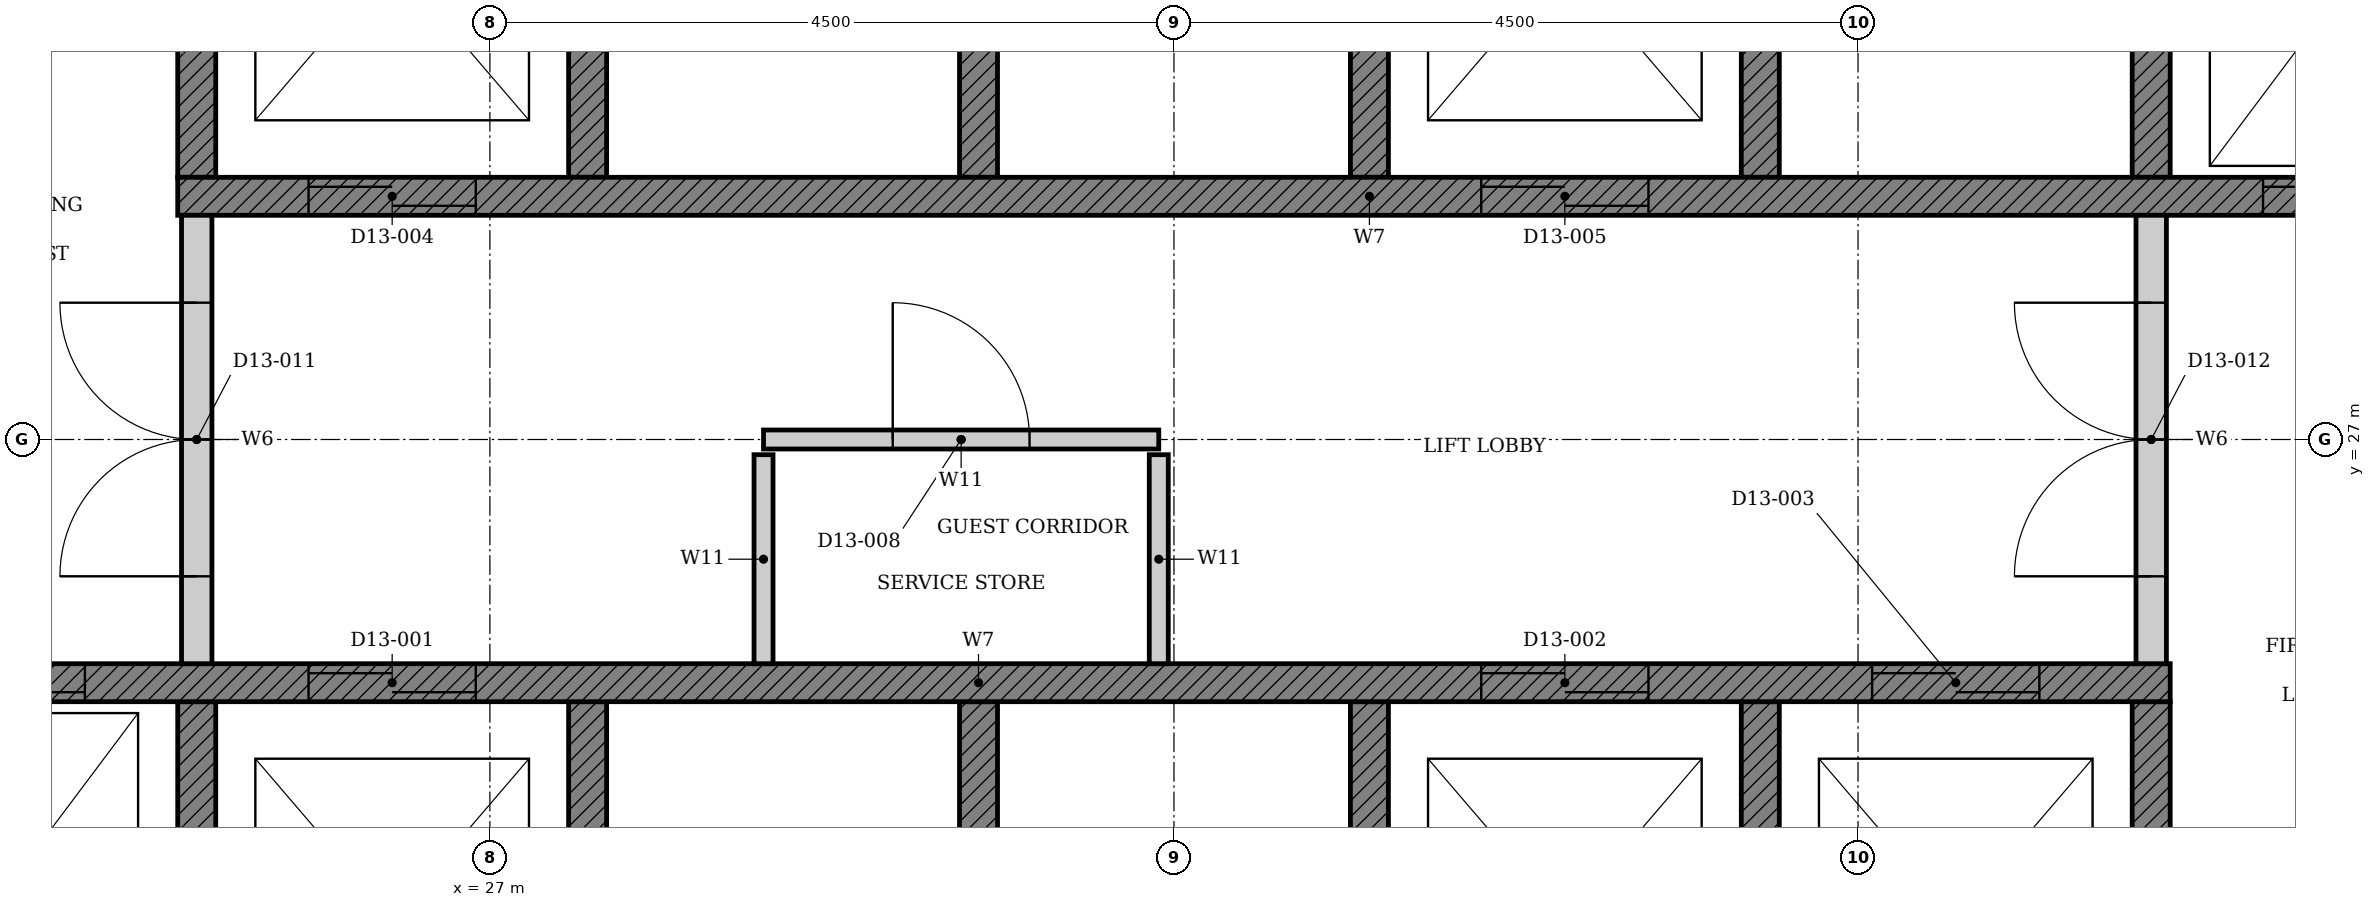
"""IFC4 building model, lengths in metres.
Left out: names, types, materials, properties, quantities, classifications, styles, units other than length and angle.
Written with IfcOpenShell. Run it as: python <this file> out.ifc"""

import sys

from ifc_helpers import new_model, si_unit, direction, frame, frame_2d, origin, place, context, subcontext, project, spatial, polyline, rectangle, outline, extrude, element, fill, save


model = new_model("IFC4")
c1 = context("Model", 3, precision=1e-05, world=origin(), true_north=direction((0.0, 1.0)))
c2 = subcontext(c1, "Body", "Model", "MODEL_VIEW")
j1 = project(units=[si_unit("LENGTHUNIT", "METRE"), si_unit("PLANEANGLEUNIT", "RADIAN")], contexts=[c1])
p1 = place(None, origin())
s1 = spatial("IfcSite", under=j1, at=p1, CompositionType="ELEMENT")
p2 = place(p1, origin())
s2 = spatial("IfcBuilding", under=s1, at=p2, CompositionType="ELEMENT")
p3 = place(p2, frame((0.0, 0.0, 60.0)))
s3 = spatial("IfcBuildingStorey", under=s2, at=p3, CompositionType="ELEMENT", Elevation=60.0)
p4 = place(p3, origin())
e1 = element("IfcWall", 1, at=p4, inside=s3, PredefinedType="SHEAR", context=c2, shape_type="SweptSolid", body=[
    extrude(outline(polyline([(22.375, 22.35), (38.053, 22.35), (38.053, 25.275), (37.803, 25.275), (37.803, 22.65), (35.482, 22.65), (35.482, 25.275), (35.232, 25.275), (35.232, 22.65), (32.911, 22.65), (32.911, 25.275), (32.661, 25.275), (32.661, 22.65), (30.339, 22.65), (30.339, 25.275), (30.089, 25.275), (30.089, 22.65), (27.768, 22.65), (27.768, 25.275), (27.518, 25.275), (27.518, 22.65), (25.197, 22.65), (25.197, 25.275), (24.947, 25.275), (24.947, 22.65), (22.625, 22.65), (22.625, 25.275), (22.375, 25.275), (22.375, 22.35)])), origin(), (0.0, 0.0, 1.0), 3.3),
])
p5 = place(p3, origin())
e2 = element("IfcWall", 2, at=p5, inside=s3, PredefinedType="SHEAR", context=c2, shape_type="SweptSolid", body=[
    extrude(outline(polyline([(24.947, 28.725), (25.197, 28.725), (25.197, 31.35), (27.518, 31.35), (27.518, 28.725), (27.768, 28.725), (27.768, 31.35), (30.089, 31.35), (30.089, 28.725), (30.339, 28.725), (30.339, 31.35), (32.661, 31.35), (32.661, 28.725), (32.911, 28.725), (32.911, 31.35), (35.232, 31.35), (35.232, 28.725), (35.482, 28.725), (35.482, 31.35), (37.803, 31.35), (37.803, 28.725), (38.053, 28.725), (38.053, 31.35), (40.375, 31.35), (40.375, 28.725), (40.625, 28.725), (40.625, 31.65), (24.947, 31.65), (24.947, 28.725)])), origin(), (0.0, 0.0, 1.0), 3.3),
])
p6 = place(p3, frame((22.375, 25.4, 0.0), z_axis=(0.0, 0.0, 1.0), x_axis=(1.0, 0.0, 0.0)))
e3 = element("IfcWall", 3, at=p6, inside=s3, PredefinedType="SHEAR", context=c2, shape_type="SweptSolid", body=[
    extrude(rectangle(XDim=15.678, YDim=0.25, at=frame_2d((7.839, 0.0))), origin(), (0.0, 0.0, 1.0), 3.3),
])
p7 = place(p6, frame((3.432, 0.0, 0.0)))
e4 = element("IfcOpeningElement", 4, at=p7, cuts=e3, PredefinedType="OPENING", context=c2, shape_type="SweptSolid", body=[
    extrude(rectangle(XDim=1.1, YDim=2.1, at=frame_2d((0.55, 1.05))), frame((0.0, 0.135, 0.0), z_axis=(0.0, -1.0, 0.0), x_axis=(1.0, 0.0, 0.0)), (0.0, 0.0, 1.0), 0.27),
])
p8 = place(p6, frame((11.146, 0.0, 0.0)))
e5 = element("IfcOpeningElement", 5, at=p8, cuts=e3, PredefinedType="OPENING", context=c2, shape_type="SweptSolid", body=[
    extrude(rectangle(XDim=1.1, YDim=2.1, at=frame_2d((0.55, 1.05))), frame((0.0, 0.135, 0.0), z_axis=(0.0, -1.0, 0.0), x_axis=(1.0, 0.0, 0.0)), (0.0, 0.0, 1.0), 0.27),
])
p9 = place(p6, frame((13.718, 0.0, 0.0)))
e6 = element("IfcOpeningElement", 6, at=p9, cuts=e3, PredefinedType="OPENING", context=c2, shape_type="SweptSolid", body=[
    extrude(rectangle(XDim=1.1, YDim=2.1, at=frame_2d((0.55, 1.05))), frame((0.0, 0.135, 0.0), z_axis=(0.0, -1.0, 0.0), x_axis=(1.0, 0.0, 0.0)), (0.0, 0.0, 1.0), 0.27),
])
p10 = place(p6, frame((0.861, 0.0, 0.0)))
e7 = element("IfcOpeningElement", 7, at=p10, cuts=e3, PredefinedType="OPENING", context=c2, shape_type="SweptSolid", body=[
    extrude(rectangle(XDim=1.1, YDim=2.1, at=frame_2d((0.55, 1.05))), frame((0.0, 0.135, 0.0), z_axis=(0.0, -1.0, 0.0), x_axis=(1.0, 0.0, 0.0)), (0.0, 0.0, 1.0), 0.27),
])
p11 = place(p3, frame((24.947, 28.6, 0.0), z_axis=(0.0, 0.0, 1.0), x_axis=(1.0, 0.0, 0.0)))
e8 = element("IfcWall", 8, at=p11, inside=s3, PredefinedType="SHEAR", context=c2, shape_type="SweptSolid", body=[
    extrude(rectangle(XDim=15.678, YDim=0.25, at=frame_2d((7.839, 0.0))), origin(), (0.0, 0.0, 1.0), 3.3),
])
p12 = place(p11, frame((0.861, 0.0, 0.0)))
e9 = element("IfcOpeningElement", 9, at=p12, cuts=e8, PredefinedType="OPENING", context=c2, shape_type="SweptSolid", body=[
    extrude(rectangle(XDim=1.1, YDim=2.1, at=frame_2d((0.55, 1.05))), frame((0.0, 0.135, 0.0), z_axis=(0.0, -1.0, 0.0), x_axis=(1.0, 0.0, 0.0)), (0.0, 0.0, 1.0), 0.27),
])
p13 = place(p11, frame((8.575, 0.0, 0.0)))
e10 = element("IfcOpeningElement", 10, at=p13, cuts=e8, PredefinedType="OPENING", context=c2, shape_type="SweptSolid", body=[
    extrude(rectangle(XDim=1.1, YDim=2.1, at=frame_2d((0.55, 1.05))), frame((0.0, 0.135, 0.0), z_axis=(0.0, -1.0, 0.0), x_axis=(1.0, 0.0, 0.0)), (0.0, 0.0, 1.0), 0.27),
])
p14 = place(p11, frame((13.718, 0.0, 0.0)))
e11 = element("IfcOpeningElement", 11, at=p14, cuts=e8, PredefinedType="OPENING", context=c2, shape_type="SweptSolid", body=[
    extrude(rectangle(XDim=1.1, YDim=2.1, at=frame_2d((0.55, 1.05))), frame((0.0, 0.135, 0.0), z_axis=(0.0, -1.0, 0.0), x_axis=(1.0, 0.0, 0.0)), (0.0, 0.0, 1.0), 0.27),
])
p15 = place(p3, frame((28.8, 27.0, 0.0), z_axis=(0.0, 0.0, 1.0), x_axis=(1.0, 0.0, 0.0)))
e12 = element("IfcWall", 12, at=p15, inside=s3, PredefinedType="PARTITIONING", context=c2, shape_type="SweptSolid", body=[
    extrude(rectangle(XDim=2.6, YDim=0.125, at=frame_2d((1.3, 0.0))), origin(), (0.0, 0.0, 1.0), 3.3),
])
p16 = place(p15, frame((0.85, 0.0, 0.0)))
e13 = element("IfcOpeningElement", 13, at=p16, cuts=e12, PredefinedType="OPENING", context=c2, shape_type="SweptSolid", body=[
    extrude(rectangle(XDim=0.9, YDim=2.1, at=frame_2d((0.45, 1.05))), frame((0.0, 0.073, 0.0), z_axis=(0.0, -1.0, 0.0), x_axis=(1.0, 0.0, 0.0)), (0.0, 0.0, 1.0), 0.145),
])
for number, where, z_axis, x_axis in (
    (14, (28.8, 25.525, 0.0), (0.0, 0.0, 1.0), (0.0, 1.0, 0.0)),
    (15, (31.4, 25.525, 0.0), (0.0, 0.0, 1.0), (0.0, 1.0, 0.0)),
):
    element("IfcWall", number, at=place(p3, frame(where, z_axis=z_axis, x_axis=x_axis)), inside=s3, PredefinedType="PARTITIONING", context=c2, shape_type="SweptSolid", body=[
        extrude(rectangle(XDim=1.375, YDim=0.125, at=frame_2d((0.688, 0.0))), origin(), (0.0, 0.0, 1.0), 3.3),
    ])
p17 = place(p3, frame((25.072, 25.525, 0.0), z_axis=(0.0, 0.0, 1.0), x_axis=(0.0, 1.0, 0.0)))
e16 = element("IfcWall", 16, at=p17, inside=s3, PredefinedType="PARTITIONING", context=c2, shape_type="SweptSolid", body=[
    extrude(rectangle(XDim=2.95, YDim=0.2, at=frame_2d((1.475, 0.0))), origin(), (0.0, 0.0, 1.0), 3.3),
])
p18 = place(p17, frame((0.575, 0.0, 0.0)))
e17 = element("IfcOpeningElement", 17, at=p18, cuts=e16, PredefinedType="OPENING", context=c2, shape_type="SweptSolid", body=[
    extrude(rectangle(XDim=1.8, YDim=2.1, at=frame_2d((0.9, 1.05))), frame((0.0, 0.11, 0.0), z_axis=(0.0, -1.0, 0.0), x_axis=(1.0, 0.0, 0.0)), (0.0, 0.0, 1.0), 0.22),
])
p19 = place(p3, frame((37.928, 25.525, 0.0), z_axis=(0.0, 0.0, 1.0), x_axis=(0.0, 1.0, 0.0)))
e18 = element("IfcWall", 18, at=p19, inside=s3, PredefinedType="PARTITIONING", context=c2, shape_type="SweptSolid", body=[
    extrude(rectangle(XDim=2.95, YDim=0.2, at=frame_2d((1.475, 0.0))), origin(), (0.0, 0.0, 1.0), 3.3),
])
p20 = place(p19, frame((0.575, 0.0, 0.0)))
e19 = element("IfcOpeningElement", 19, at=p20, cuts=e18, PredefinedType="OPENING", context=c2, shape_type="SweptSolid", body=[
    extrude(rectangle(XDim=1.8, YDim=2.1, at=frame_2d((0.9, 1.05))), frame((0.0, 0.11, 0.0), z_axis=(0.0, -1.0, 0.0), x_axis=(1.0, 0.0, 0.0)), (0.0, 0.0, 1.0), 0.22),
])
p21 = place(p7, origin())
e20 = element("IfcDoor", 20, at=p21, inside=s3, OperationType="DOUBLE_DOOR_SLIDING", PredefinedType="DOOR", context=c2, shape_type="SweptSolid", body=[
    extrude(rectangle(XDim=1.1, YDim=2.1, at=frame_2d((0.55, 1.05))), frame((0.0, 0.025, 0.0), z_axis=(0.0, -1.0, 0.0), x_axis=(1.0, 0.0, 0.0)), (0.0, 0.0, 1.0), 0.05),
])
fill(e4, e20)
p22 = place(p8, origin())
e21 = element("IfcDoor", 21, at=p22, inside=s3, OperationType="DOUBLE_DOOR_SLIDING", PredefinedType="DOOR", context=c2, shape_type="SweptSolid", body=[
    extrude(rectangle(XDim=1.1, YDim=2.1, at=frame_2d((0.55, 1.05))), frame((0.0, 0.025, 0.0), z_axis=(0.0, -1.0, 0.0), x_axis=(1.0, 0.0, 0.0)), (0.0, 0.0, 1.0), 0.05),
])
fill(e5, e21)
p23 = place(p9, origin())
e22 = element("IfcDoor", 22, at=p23, inside=s3, OperationType="DOUBLE_DOOR_SLIDING", PredefinedType="DOOR", context=c2, shape_type="SweptSolid", body=[
    extrude(rectangle(XDim=1.1, YDim=2.1, at=frame_2d((0.55, 1.05))), frame((0.0, 0.025, 0.0), z_axis=(0.0, -1.0, 0.0), x_axis=(1.0, 0.0, 0.0)), (0.0, 0.0, 1.0), 0.05),
])
fill(e6, e22)
p24 = place(p12, origin())
e23 = element("IfcDoor", 23, at=p24, inside=s3, OperationType="DOUBLE_DOOR_SLIDING", PredefinedType="DOOR", context=c2, shape_type="SweptSolid", body=[
    extrude(rectangle(XDim=1.1, YDim=2.1, at=frame_2d((0.55, 1.05))), frame((0.0, 0.025, 0.0), z_axis=(0.0, -1.0, 0.0), x_axis=(1.0, 0.0, 0.0)), (0.0, 0.0, 1.0), 0.05),
])
fill(e9, e23)
p25 = place(p13, origin())
e24 = element("IfcDoor", 24, at=p25, inside=s3, OperationType="DOUBLE_DOOR_SLIDING", PredefinedType="DOOR", context=c2, shape_type="SweptSolid", body=[
    extrude(rectangle(XDim=1.1, YDim=2.1, at=frame_2d((0.55, 1.05))), frame((0.0, 0.025, 0.0), z_axis=(0.0, -1.0, 0.0), x_axis=(1.0, 0.0, 0.0)), (0.0, 0.0, 1.0), 0.05),
])
fill(e10, e24)
p26 = place(p10, origin())
e25 = element("IfcDoor", 25, at=p26, inside=s3, OperationType="DOUBLE_DOOR_SLIDING", PredefinedType="DOOR", context=c2, shape_type="SweptSolid", body=[
    extrude(rectangle(XDim=1.1, YDim=2.1, at=frame_2d((0.55, 1.05))), frame((0.0, 0.025, 0.0), z_axis=(0.0, -1.0, 0.0), x_axis=(1.0, 0.0, 0.0)), (0.0, 0.0, 1.0), 0.05),
])
fill(e7, e25)
p27 = place(p14, origin())
e26 = element("IfcDoor", 26, at=p27, inside=s3, OperationType="DOUBLE_DOOR_SLIDING", PredefinedType="DOOR", context=c2, shape_type="SweptSolid", body=[
    extrude(rectangle(XDim=1.1, YDim=2.1, at=frame_2d((0.55, 1.05))), frame((0.0, 0.025, 0.0), z_axis=(0.0, -1.0, 0.0), x_axis=(1.0, 0.0, 0.0)), (0.0, 0.0, 1.0), 0.05),
])
fill(e11, e26)
p28 = place(p16, origin())
e27 = element("IfcDoor", 27, at=p28, inside=s3, OperationType="SINGLE_SWING_LEFT", PredefinedType="DOOR", context=c2, shape_type="SweptSolid", body=[
    extrude(rectangle(XDim=0.9, YDim=2.1, at=frame_2d((0.45, 1.05))), frame((0.0, 0.025, 0.0), z_axis=(0.0, -1.0, 0.0), x_axis=(1.0, 0.0, 0.0)), (0.0, 0.0, 1.0), 0.05),
])
fill(e13, e27)
p29 = place(p18, origin())
e28 = element("IfcDoor", 28, at=p29, inside=s3, OperationType="DOUBLE_DOOR_SINGLE_SWING", PredefinedType="DOOR", context=c2, shape_type="SweptSolid", body=[
    extrude(rectangle(XDim=1.8, YDim=2.1, at=frame_2d((0.9, 1.05))), frame((0.0, 0.025, 0.0), z_axis=(0.0, -1.0, 0.0), x_axis=(1.0, 0.0, 0.0)), (0.0, 0.0, 1.0), 0.05),
])
fill(e17, e28)
p30 = place(p20, origin())
e29 = element("IfcDoor", 29, at=p30, inside=s3, OperationType="DOUBLE_DOOR_SINGLE_SWING", PredefinedType="DOOR", context=c2, shape_type="SweptSolid", body=[
    extrude(rectangle(XDim=1.8, YDim=2.1, at=frame_2d((0.9, 1.05))), frame((0.0, 0.025, 0.0), z_axis=(0.0, -1.0, 0.0), x_axis=(1.0, 0.0, 0.0)), (0.0, 0.0, 1.0), 0.05),
])
fill(e19, e29)
save(model, sys.argv[1])
